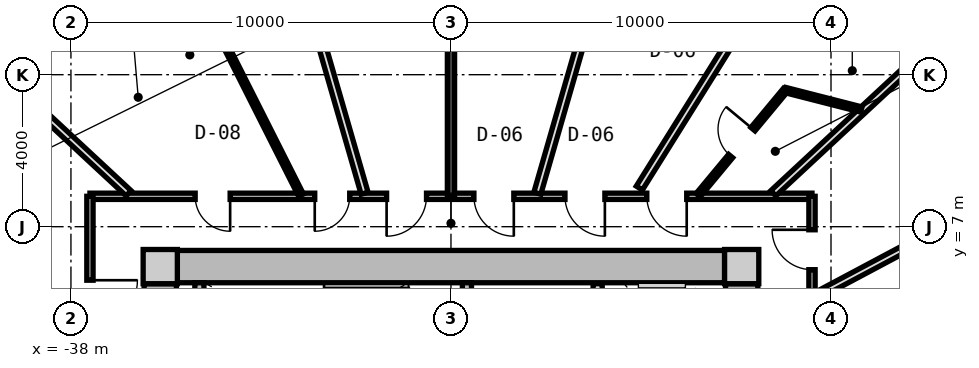
"""IFC4 building model, lengths in metres.
Left out: names, types, materials, properties, quantities, classifications, styles, units other than length and angle.
Written with IfcOpenShell. Run it as: python <this file> out.ifc"""

import sys

from ifc_helpers import new_model, si_unit, direction, frame, frame_2d, origin, origin_2d, place, context, subcontext, project, spatial, rectangle, extrude, source, transform, mapped, element, fill, save


model = new_model("IFC4")
c1 = context("Model", 3, precision=1e-05, world=origin(), true_north=direction((0.0, 1.0)))
c2 = subcontext(c1, "Body", "Model", "MODEL_VIEW")
j1 = project(units=[si_unit("LENGTHUNIT", "METRE"), si_unit("PLANEANGLEUNIT", "RADIAN")], contexts=[c1])
p1 = place(None, origin())
s1 = spatial("IfcSite", under=j1, at=p1, CompositionType="ELEMENT")
p2 = place(p1, origin())
s2 = spatial("IfcBuilding", under=s1, at=p2, CompositionType="ELEMENT")
p3 = place(p2, frame((0.0, 0.0, 24.65)))
s3 = spatial("IfcBuildingStorey", under=s2, at=p3, CompositionType="ELEMENT", Elevation=24.65)
m1 = source(origin(), c2, "Body", "SweptSolid", [
    extrude(rectangle(XDim=0.9, YDim=0.9, at=origin_2d()), origin(), (0.0, 0.0, 1.0), 3.05),
])
for number, where, z_axis, x_axis in (
    (1, (-20.35, 5.95, 0.0), (0.0, 0.0, 1.0), (1.0, 0.0, 0.0)),
    (2, (-35.65, 5.95, 0.0), (0.0, 0.0, 1.0), (1.0, 0.0, 0.0)),
):
    element("IfcColumn", number, at=place(p3, frame(where, z_axis=z_axis, x_axis=x_axis)), inside=s3, PredefinedType="COLUMN", context=c2, shape_type="MappedRepresentation", body=[
        mapped(m1, transform((0.0, 0.0, 0.0), x_axis=(1.0, 0.0, 0.0), y_axis=(0.0, 1.0, 0.0), z_axis=(0.0, 0.0, 1.0), scale=1.0)),
    ])
m2 = source(origin(), c2, "Body", "SweptSolid", [
    extrude(rectangle(XDim=14.4, YDim=0.85, at=frame_2d((7.2, 0.0))), origin(), (0.0, 0.0, 1.0), 2.79),
])
p4 = place(p3, frame((-35.2, 5.95, 0.0), z_axis=(0.0, 0.0, 1.0), x_axis=(1.0, 0.0, 0.0)))
e3 = element("IfcWall", 3, at=p4, inside=s3, PredefinedType="SHEAR", context=c2, shape_type="MappedRepresentation", body=[
    mapped(m2, transform((0.0, 0.0, 0.0), x_axis=(1.0, 0.0, 0.0), y_axis=(0.0, 1.0, 0.0), z_axis=(0.0, 0.0, 1.0), scale=1.0)),
])
m3 = source(origin(), c2, "Body", "SweptSolid", [
    extrude(rectangle(XDim=11.0, YDim=0.85, at=frame_2d((5.5, 0.0))), origin(), (0.0, 0.0, 1.0), 2.79),
])
p5 = place(p3, frame((-35.65, -5.5, 0.0), z_axis=(0.0, 0.0, 1.0), x_axis=(0.0, 1.0, 0.0)))
e4 = element("IfcWall", 4, at=p5, inside=s3, PredefinedType="SHEAR", context=c2, shape_type="MappedRepresentation", body=[
    mapped(m3, transform((0.0, 0.0, 0.0), x_axis=(1.0, 0.0, 0.0), y_axis=(0.0, 1.0, 0.0), z_axis=(0.0, 0.0, 1.0), scale=1.0)),
])
p6 = place(p5, frame((3.8, 0.0, 0.0)))
e5 = element("IfcOpeningElement", 5, at=p6, cuts=e4, PredefinedType="OPENING", context=c2, shape_type="SweptSolid", body=[
    extrude(rectangle(XDim=1.2, YDim=2.15, at=frame_2d((0.6, 1.075))), frame((0.0, 0.435, 0.0), z_axis=(0.0, -1.0, 0.0), x_axis=(1.0, 0.0, 0.0)), (0.0, 0.0, 1.0), 0.87),
])
p7 = place(p3, frame((-20.35, 5.5, 0.0), z_axis=(0.0, 0.0, 1.0), x_axis=(0.0, -1.0, 0.0)))
e6 = element("IfcWall", 6, at=p7, inside=s3, PredefinedType="SHEAR", context=c2, shape_type="MappedRepresentation", body=[
    mapped(m3, transform((0.0, 0.0, 0.0), x_axis=(1.0, 0.0, 0.0), y_axis=(0.0, 1.0, 0.0), z_axis=(0.0, 0.0, 1.0), scale=1.0)),
])
p8 = place(p7, frame((5.65, 0.0, 0.0)))
e7 = element("IfcOpeningElement", 7, at=p8, cuts=e6, PredefinedType="OPENING", context=c2, shape_type="SweptSolid", body=[
    extrude(rectangle(XDim=1.2, YDim=2.15, at=frame_2d((0.6, 1.075))), frame((0.0, 0.435, 0.0), z_axis=(0.0, -1.0, 0.0), x_axis=(1.0, 0.0, 0.0)), (0.0, 0.0, 1.0), 0.87),
])
m4 = source(origin(), c2, "Body", "SweptSolid", [
    extrude(rectangle(XDim=3.075, YDim=0.24, at=frame_2d((1.538, 0.0))), origin(), (0.0, 0.0, 1.0), 2.79),
])
p9 = place(p3, frame((-34.62, 2.45, 0.0), z_axis=(0.0, 0.0, 1.0), x_axis=(0.0, 1.0, 0.0)))
e8 = element("IfcWall", 8, at=p9, inside=s3, PredefinedType="PARTITIONING", context=c2, shape_type="MappedRepresentation", body=[
    mapped(m4, transform((0.0, 0.0, 0.0), x_axis=(1.0, 0.0, 0.0), y_axis=(0.0, 1.0, 0.0), z_axis=(0.0, 0.0, 1.0), scale=1.0)),
])
p10 = place(p3, frame((-27.58, 2.45, 0.0), z_axis=(0.0, 0.0, 1.0), x_axis=(0.0, 1.0, 0.0)))
e9 = element("IfcWall", 9, at=p10, inside=s3, PredefinedType="PARTITIONING", context=c2, shape_type="MappedRepresentation", body=[
    mapped(m4, transform((0.0, 0.0, 0.0), x_axis=(1.0, 0.0, 0.0), y_axis=(0.0, 1.0, 0.0), z_axis=(0.0, 0.0, 1.0), scale=1.0)),
])
p11 = place(p10, frame((0.55, 0.0, 0.0)))
e10 = element("IfcOpeningElement", 10, at=p11, cuts=e9, PredefinedType="OPENING", context=c2, shape_type="SweptSolid", body=[
    extrude(rectangle(XDim=1.1, YDim=2.15, at=frame_2d((0.55, 1.075))), frame((0.0, 0.13, 0.0), z_axis=(0.0, -1.0, 0.0), x_axis=(1.0, 0.0, 0.0)), (0.0, 0.0, 1.0), 0.26),
])
m5 = source(origin(), c2, "Body", "SweptSolid", [
    extrude(rectangle(XDim=5.0, YDim=0.24, at=frame_2d((2.5, 0.0))), origin(), (0.0, 0.0, 1.0), 2.775),
])
p12 = place(p3, frame((-24.14, 0.5, 0.0), z_axis=(0.0, 0.0, 1.0), x_axis=(0.0, 1.0, 0.0)))
e11 = element("IfcWall", 11, at=p12, inside=s3, PredefinedType="PARTITIONING", context=c2, shape_type="MappedRepresentation", body=[
    mapped(m5, transform((0.0, 0.0, 0.0), x_axis=(1.0, 0.0, 0.0), y_axis=(0.0, 1.0, 0.0), z_axis=(0.0, 0.0, 1.0), scale=1.0)),
])
p13 = place(p12, frame((3.05, 0.0, 0.0)))
e12 = element("IfcOpeningElement", 12, at=p13, cuts=e11, PredefinedType="OPENING", context=c2, shape_type="SweptSolid", body=[
    extrude(rectangle(XDim=1.3, YDim=2.2, at=frame_2d((0.65, 1.1))), frame((0.0, 0.13, 0.0), z_axis=(0.0, -1.0, 0.0), x_axis=(1.0, 0.0, 0.0)), (0.0, 0.0, 1.0), 0.26),
])
p14 = place(p12, frame((0.55, 0.0, 0.0)))
e13 = element("IfcOpeningElement", 13, at=p14, cuts=e11, PredefinedType="OPENING", context=c2, shape_type="SweptSolid", body=[
    extrude(rectangle(XDim=1.3, YDim=2.2, at=frame_2d((0.65, 1.1))), frame((0.0, 0.13, 0.0), z_axis=(0.0, -1.0, 0.0), x_axis=(1.0, 0.0, 0.0)), (0.0, 0.0, 1.0), 0.26),
])
m6 = source(origin(), c2, "Body", "SweptSolid", [
    extrude(rectangle(XDim=19.0, YDim=0.165, at=frame_2d((9.5, 0.0))), origin(), (0.0, 0.0, 1.0), 2.775),
])
p15 = place(p3, frame((-37.5, 7.8, 0.0), z_axis=(0.0, 0.0, 1.0), x_axis=(1.0, 0.0, 0.0)))
e14 = element("IfcWall", 14, at=p15, inside=s3, PredefinedType="PARTITIONING", context=c2, shape_type="MappedRepresentation", body=[
    mapped(m6, transform((0.0, 0.0, 0.0), x_axis=(1.0, 0.0, 0.0), y_axis=(0.0, 1.0, 0.0), z_axis=(0.0, 0.0, 1.0), scale=1.0)),
])
p16 = place(p15, frame((14.653, 0.0, 0.0)))
e15 = element("IfcOpeningElement", 15, at=p16, cuts=e14, PredefinedType="OPENING", context=c2, shape_type="SweptSolid", body=[
    extrude(rectangle(XDim=1.05, YDim=2.15, at=frame_2d((0.525, 1.075))), frame((0.0, 0.093, 0.0), z_axis=(0.0, -1.0, 0.0), x_axis=(1.0, 0.0, 0.0)), (0.0, 0.0, 1.0), 0.185),
])
p17 = place(p15, frame((12.5, 0.0, 0.0)))
e16 = element("IfcOpeningElement", 16, at=p17, cuts=e14, PredefinedType="OPENING", context=c2, shape_type="SweptSolid", body=[
    extrude(rectangle(XDim=1.05, YDim=2.15, at=frame_2d((0.525, 1.075))), frame((0.0, 0.093, 0.0), z_axis=(0.0, -1.0, 0.0), x_axis=(1.0, 0.0, 0.0)), (0.0, 0.0, 1.0), 0.185),
])
p18 = place(p15, frame((10.104, 0.0, 0.0)))
e17 = element("IfcOpeningElement", 17, at=p18, cuts=e14, PredefinedType="OPENING", context=c2, shape_type="SweptSolid", body=[
    extrude(rectangle(XDim=1.05, YDim=2.15, at=frame_2d((0.525, 1.075))), frame((0.0, 0.093, 0.0), z_axis=(0.0, -1.0, 0.0), x_axis=(1.0, 0.0, 0.0)), (0.0, 0.0, 1.0), 0.185),
])
p19 = place(p15, frame((7.806, 0.0, 0.0)))
e18 = element("IfcOpeningElement", 18, at=p19, cuts=e14, PredefinedType="OPENING", context=c2, shape_type="SweptSolid", body=[
    extrude(rectangle(XDim=1.05, YDim=2.15, at=frame_2d((0.525, 1.075))), frame((0.0, 0.093, 0.0), z_axis=(0.0, -1.0, 0.0), x_axis=(1.0, 0.0, 0.0)), (0.0, 0.0, 1.0), 0.185),
])
p20 = place(p15, frame((5.915, 0.0, 0.0)))
e19 = element("IfcOpeningElement", 19, at=p20, cuts=e14, PredefinedType="OPENING", context=c2, shape_type="SweptSolid", body=[
    extrude(rectangle(XDim=0.92, YDim=2.1, at=frame_2d((0.46, 1.05))), frame((0.0, 0.093, 0.0), z_axis=(0.0, -1.0, 0.0), x_axis=(1.0, 0.0, 0.0)), (0.0, 0.0, 1.0), 0.185),
])
p21 = place(p15, frame((2.769, 0.0, 0.0)))
e20 = element("IfcOpeningElement", 20, at=p21, cuts=e14, PredefinedType="OPENING", context=c2, shape_type="SweptSolid", body=[
    extrude(rectangle(XDim=0.92, YDim=2.1, at=frame_2d((0.46, 1.05))), frame((0.0, 0.093, 0.0), z_axis=(0.0, -1.0, 0.0), x_axis=(1.0, 0.0, 0.0)), (0.0, 0.0, 1.0), 0.185),
])
m7 = source(origin(), c2, "Body", "SweptSolid", [
    extrude(rectangle(XDim=15.6, YDim=0.165, at=frame_2d((7.8, 0.0))), origin(), (0.0, 0.0, 1.0), 2.775),
])
p22 = place(p3, frame((-37.5, -7.8, 0.0), z_axis=(0.0, 0.0, 1.0), x_axis=(0.0, 1.0, 0.0)))
e21 = element("IfcWall", 21, at=p22, inside=s3, PredefinedType="PARTITIONING", context=c2, shape_type="MappedRepresentation", body=[
    mapped(m7, transform((0.0, 0.0, 0.0), x_axis=(1.0, 0.0, 0.0), y_axis=(0.0, 1.0, 0.0), z_axis=(0.0, 0.0, 1.0), scale=1.0)),
])
p23 = place(p22, frame((12.141, 0.0, 0.0)))
e22 = element("IfcOpeningElement", 22, at=p23, cuts=e21, PredefinedType="OPENING", context=c2, shape_type="SweptSolid", body=[
    extrude(rectangle(XDim=1.25, YDim=2.2, at=frame_2d((0.625, 1.1))), frame((0.0, 0.093, 0.0), z_axis=(0.0, -1.0, 0.0), x_axis=(1.0, 0.0, 0.0)), (0.0, 0.0, 1.0), 0.185),
])
p24 = place(p22, frame((7.175, 0.0, 0.0)))
e23 = element("IfcOpeningElement", 23, at=p24, cuts=e21, PredefinedType="OPENING", context=c2, shape_type="SweptSolid", body=[
    extrude(rectangle(XDim=1.25, YDim=2.2, at=frame_2d((0.625, 1.1))), frame((0.0, 0.093, 0.0), z_axis=(0.0, -1.0, 0.0), x_axis=(1.0, 0.0, 0.0)), (0.0, 0.0, 1.0), 0.185),
])
p25 = place(p22, frame((2.208, 0.0, 0.0)))
e24 = element("IfcOpeningElement", 24, at=p25, cuts=e21, PredefinedType="OPENING", context=c2, shape_type="SweptSolid", body=[
    extrude(rectangle(XDim=1.25, YDim=2.2, at=frame_2d((0.625, 1.1))), frame((0.0, 0.093, 0.0), z_axis=(0.0, -1.0, 0.0), x_axis=(1.0, 0.0, 0.0)), (0.0, 0.0, 1.0), 0.185),
])
p26 = place(p3, frame((-18.5, 7.8, 0.0), z_axis=(0.0, 0.0, 1.0), x_axis=(0.0, -1.0, 0.0)))
e25 = element("IfcWall", 25, at=p26, inside=s3, PredefinedType="PARTITIONING", context=c2, shape_type="MappedRepresentation", body=[
    mapped(m7, transform((0.0, 0.0, 0.0), x_axis=(1.0, 0.0, 0.0), y_axis=(0.0, 1.0, 0.0), z_axis=(0.0, 0.0, 1.0), scale=1.0)),
])
p27 = place(p26, frame((12.141, 0.0, 0.0)))
e26 = element("IfcOpeningElement", 26, at=p27, cuts=e25, PredefinedType="OPENING", context=c2, shape_type="SweptSolid", body=[
    extrude(rectangle(XDim=1.25, YDim=2.2, at=frame_2d((0.625, 1.1))), frame((0.0, 0.093, 0.0), z_axis=(0.0, -1.0, 0.0), x_axis=(1.0, 0.0, 0.0)), (0.0, 0.0, 1.0), 0.185),
])
p28 = place(p26, frame((7.175, 0.0, 0.0)))
e27 = element("IfcOpeningElement", 27, at=p28, cuts=e25, PredefinedType="OPENING", context=c2, shape_type="SweptSolid", body=[
    extrude(rectangle(XDim=1.25, YDim=2.2, at=frame_2d((0.625, 1.1))), frame((0.0, 0.093, 0.0), z_axis=(0.0, -1.0, 0.0), x_axis=(1.0, 0.0, 0.0)), (0.0, 0.0, 1.0), 0.185),
])
p29 = place(p26, frame((2.826, 0.0, 0.0)))
e28 = element("IfcOpeningElement", 28, at=p29, cuts=e25, PredefinedType="OPENING", context=c2, shape_type="SweptSolid", body=[
    extrude(rectangle(XDim=1.05, YDim=2.15, at=frame_2d((0.525, 1.075))), frame((0.0, 0.093, 0.0), z_axis=(0.0, -1.0, 0.0), x_axis=(1.0, 0.0, 0.0)), (0.0, 0.0, 1.0), 0.185),
])
p30 = place(p26, frame((0.881, 0.0, 0.0)))
e29 = element("IfcOpeningElement", 29, at=p30, cuts=e25, PredefinedType="OPENING", context=c2, shape_type="SweptSolid", body=[
    extrude(rectangle(XDim=1.05, YDim=2.15, at=frame_2d((0.525, 1.075))), frame((0.0, 0.093, 0.0), z_axis=(0.0, -1.0, 0.0), x_axis=(1.0, 0.0, 0.0)), (0.0, 0.0, 1.0), 0.185),
])
m8 = source(origin(), c2, "Body", "SweptSolid", [
    extrude(rectangle(XDim=7.435, YDim=0.19, at=frame_2d((3.717, 0.0))), origin(), (0.0, 0.0, 1.0), 2.225),
])
p31 = place(p3, frame((-19.517, 7.88, 0.0), z_axis=(0.0, 0.0, 1.0), x_axis=(0.732651956848, 0.680603489652, 0.0)))
e30 = element("IfcWall", 30, at=p31, inside=s3, PredefinedType="PARTITIONING", context=c2, shape_type="MappedRepresentation", body=[
    mapped(m8, transform((0.0, 0.0, 0.0), x_axis=(1.0, 0.0, 0.0), y_axis=(0.0, 1.0, 0.0), z_axis=(0.0, 0.0, 1.0), scale=1.0)),
])
m9 = source(origin(), c2, "Body", "SweptSolid", [
    extrude(rectangle(XDim=10.196, YDim=0.19, at=frame_2d((5.098, 0.0))), origin(), (0.0, 0.0, 1.0), 2.225),
])
p32 = place(p3, frame((-25.727, 7.88, 0.0), z_axis=(0.0, 0.0, 1.0), x_axis=(0.277136420347, 0.960830580549, 0.0)))
e31 = element("IfcWall", 31, at=p32, inside=s3, PredefinedType="PARTITIONING", context=c2, shape_type="MappedRepresentation", body=[
    mapped(m9, transform((0.0, 0.0, 0.0), x_axis=(1.0, 0.0, 0.0), y_axis=(0.0, 1.0, 0.0), z_axis=(0.0, 0.0, 1.0), scale=1.0)),
])
m10 = source(origin(), c2, "Body", "SweptSolid", [
    extrude(rectangle(XDim=8.598, YDim=0.19, at=frame_2d((4.299, 0.0))), origin(), (0.0, 0.0, 1.0), 2.775),
])
p33 = place(p3, frame((-23.043, 8.017, 0.0), z_axis=(0.0, 0.0, 1.0), x_axis=(0.530039776395, 0.847972779893, 0.0)))
e32 = element("IfcWall", 32, at=p33, inside=s3, PredefinedType="PARTITIONING", context=c2, shape_type="MappedRepresentation", body=[
    mapped(m10, transform((0.0, 0.0, 0.0), x_axis=(1.0, 0.0, 0.0), y_axis=(0.0, 1.0, 0.0), z_axis=(0.0, 0.0, 1.0), scale=1.0)),
])
m11 = source(origin(), c2, "Body", "SweptSolid", [
    extrude(rectangle(XDim=3.594, YDim=0.14, at=frame_2d((1.797, 0.0))), origin(), (0.0, 0.0, 1.0), 2.775),
])
p34 = place(p3, frame((-21.496, 7.83, 0.0), z_axis=(0.0, 0.0, 1.0), x_axis=(0.639001147083, 0.769205781326, 0.0)))
e33 = element("IfcWall", 33, at=p34, inside=s3, PredefinedType="PARTITIONING", context=c2, shape_type="MappedRepresentation", body=[
    mapped(m11, transform((0.0, 0.0, 0.0), x_axis=(1.0, 0.0, 0.0), y_axis=(0.0, 1.0, 0.0), z_axis=(0.0, 0.0, 1.0), scale=1.0)),
])
p35 = place(p34, frame((1.337, 0.0, 0.0)))
e34 = element("IfcOpeningElement", 34, at=p35, cuts=e33, PredefinedType="OPENING", context=c2, shape_type="SweptSolid", body=[
    extrude(rectangle(XDim=0.92, YDim=2.1, at=frame_2d((0.46, 1.05))), frame((0.0, 0.08, 0.0), z_axis=(0.0, -1.0, 0.0), x_axis=(1.0, 0.0, 0.0)), (0.0, 0.0, 1.0), 0.16),
])
m12 = source(origin(), c2, "Body", "SweptSolid", [
    extrude(rectangle(XDim=2.062, YDim=0.14, at=frame_2d((1.031, 0.0))), origin(), (0.0, 0.0, 1.0), 2.415),
])
p36 = place(p3, frame((-19.199, 10.595, 0.0), z_axis=(0.0, 0.0, 1.0), x_axis=(0.968776253543, -0.247936626121, 0.0)))
e35 = element("IfcWall", 35, at=p36, inside=s3, PredefinedType="PARTITIONING", context=c2, shape_type="MappedRepresentation", body=[
    mapped(m12, transform((0.0, 0.0, 0.0), x_axis=(1.0, 0.0, 0.0), y_axis=(0.0, 1.0, 0.0), z_axis=(0.0, 0.0, 1.0), scale=1.0)),
])
p37 = place(p3, frame((-30.273, 7.88, 0.0), z_axis=(0.0, 0.0, 1.0), x_axis=(-0.277136420347, 0.960830580549, 0.0)))
e36 = element("IfcWall", 36, at=p37, inside=s3, PredefinedType="PARTITIONING", context=c2, shape_type="MappedRepresentation", body=[
    mapped(m9, transform((0.0, 0.0, 0.0), x_axis=(1.0, 0.0, 0.0), y_axis=(0.0, 1.0, 0.0), z_axis=(0.0, 0.0, 1.0), scale=1.0)),
])
m13 = source(origin(), c2, "Body", "SweptSolid", [
    extrude(rectangle(XDim=9.846, YDim=0.19, at=frame_2d((4.923, 0.0))), origin(), (0.0, 0.0, 1.0), 2.775),
])
p38 = place(p3, frame((-28.0, 7.83, 0.0), z_axis=(0.0, 0.0, 1.0), x_axis=(0.0, 1.0, 0.0)))
e37 = element("IfcWall", 37, at=p38, inside=s3, PredefinedType="PARTITIONING", context=c2, shape_type="MappedRepresentation", body=[
    mapped(m13, transform((0.0, 0.0, 0.0), x_axis=(1.0, 0.0, 0.0), y_axis=(0.0, 1.0, 0.0), z_axis=(0.0, 0.0, 1.0), scale=1.0)),
])
p39 = place(p3, frame((-36.483, 7.88, 0.0), z_axis=(0.0, 0.0, 1.0), x_axis=(-0.732651956848, 0.680603489652, 0.0)))
e38 = element("IfcWall", 38, at=p39, inside=s3, PredefinedType="PARTITIONING", context=c2, shape_type="MappedRepresentation", body=[
    mapped(m8, transform((0.0, 0.0, 0.0), x_axis=(1.0, 0.0, 0.0), y_axis=(0.0, 1.0, 0.0), z_axis=(0.0, 0.0, 1.0), scale=1.0)),
])
m14 = source(origin(), c2, "Body", "SweptSolid", [
    extrude(rectangle(XDim=9.225, YDim=0.14, at=frame_2d((4.613, 0.0))), origin(), (0.0, 0.0, 1.0), 2.775),
])
p40 = place(p3, frame((-31.946, 7.83, 0.0), z_axis=(0.0, 0.0, 1.0), x_axis=(-0.450460543767, 0.892796336523, 0.0)))
e39 = element("IfcWall", 39, at=p40, inside=s3, PredefinedType="PARTITIONING", context=c2, shape_type="MappedRepresentation", body=[
    mapped(m14, transform((0.0, 0.0, 0.0), x_axis=(1.0, 0.0, 0.0), y_axis=(0.0, 1.0, 0.0), z_axis=(0.0, 0.0, 1.0), scale=1.0)),
])
m15 = source(origin(), c2, "Body", "SweptSolid", [
    extrude(rectangle(XDim=7.677, YDim=0.19, at=frame_2d((3.838, 0.0))), origin(), (0.0, 0.0, 1.0), 2.775),
])
p41 = place(p3, frame((-18.297, 5.231, 0.0), z_axis=(0.0, 0.0, 1.0), x_axis=(0.882725057546, 0.469889851753, 0.0)))
e40 = element("IfcWall", 40, at=p41, inside=s3, PredefinedType="PARTITIONING", context=c2, shape_type="MappedRepresentation", body=[
    mapped(m15, transform((0.0, 0.0, 0.0), x_axis=(1.0, 0.0, 0.0), y_axis=(0.0, 1.0, 0.0), z_axis=(0.0, 0.0, 1.0), scale=1.0)),
])
m16 = source(origin(), c2, "Body", "SweptSolid", [
    extrude(rectangle(XDim=1.05, YDim=2.15, at=frame_2d((0.525, 1.075))), frame((0.0, 0.025, 0.0), z_axis=(0.0, -1.0, 0.0), x_axis=(1.0, 0.0, 0.0)), (0.0, 0.0, 1.0), 0.05),
])
p42 = place(p16, frame((1.05, 0.0, 0.0), z_axis=(0.0, 0.0, 1.0), x_axis=(-1.0, 0.0, 0.0)))
e41 = element("IfcDoor", 41, at=p42, inside=s3, OperationType="SINGLE_SWING_LEFT", PredefinedType="DOOR", context=c2, shape_type="MappedRepresentation", body=[
    mapped(m16, transform((0.0, 0.0, 0.0), x_axis=(1.0, 0.0, 0.0), y_axis=(0.0, 1.0, 0.0), z_axis=(0.0, 0.0, 1.0), scale=1.0)),
])
fill(e15, e41)
m17 = source(origin(), c2, "Body", "SweptSolid", [
    extrude(rectangle(XDim=0.92, YDim=2.1, at=frame_2d((0.46, 1.05))), frame((0.0, 0.025, 0.0), z_axis=(0.0, -1.0, 0.0), x_axis=(1.0, 0.0, 0.0)), (0.0, 0.0, 1.0), 0.05),
])
p43 = place(p35, origin())
e42 = element("IfcDoor", 42, at=p43, inside=s3, OperationType="SINGLE_SWING_RIGHT", PredefinedType="DOOR", context=c2, shape_type="MappedRepresentation", body=[
    mapped(m17, transform((0.0, 0.0, 0.0), x_axis=(1.0, 0.0, 0.0), y_axis=(0.0, 1.0, 0.0), z_axis=(0.0, 0.0, 1.0), scale=1.0)),
])
fill(e34, e42)
p44 = place(p17, frame((1.05, 0.0, 0.0), z_axis=(0.0, 0.0, 1.0), x_axis=(-1.0, 0.0, 0.0)))
e43 = element("IfcDoor", 43, at=p44, inside=s3, OperationType="SINGLE_SWING_LEFT", PredefinedType="DOOR", context=c2, shape_type="MappedRepresentation", body=[
    mapped(m16, transform((0.0, 0.0, 0.0), x_axis=(1.0, 0.0, 0.0), y_axis=(0.0, 1.0, 0.0), z_axis=(0.0, 0.0, 1.0), scale=1.0)),
])
fill(e16, e43)
p45 = place(p18, frame((1.05, 0.0, 0.0), z_axis=(0.0, 0.0, 1.0), x_axis=(-1.0, 0.0, 0.0)))
e44 = element("IfcDoor", 44, at=p45, inside=s3, OperationType="SINGLE_SWING_LEFT", PredefinedType="DOOR", context=c2, shape_type="MappedRepresentation", body=[
    mapped(m16, transform((0.0, 0.0, 0.0), x_axis=(1.0, 0.0, 0.0), y_axis=(0.0, 1.0, 0.0), z_axis=(0.0, 0.0, 1.0), scale=1.0)),
])
fill(e17, e44)
p46 = place(p19, frame((1.05, 0.0, 0.0), z_axis=(0.0, 0.0, 1.0), x_axis=(-1.0, 0.0, 0.0)))
e45 = element("IfcDoor", 45, at=p46, inside=s3, OperationType="SINGLE_SWING_RIGHT", PredefinedType="DOOR", context=c2, shape_type="MappedRepresentation", body=[
    mapped(m16, transform((0.0, 0.0, 0.0), x_axis=(1.0, 0.0, 0.0), y_axis=(0.0, 1.0, 0.0), z_axis=(0.0, 0.0, 1.0), scale=1.0)),
])
fill(e18, e45)
p47 = place(p20, frame((0.92, 0.0, 0.0), z_axis=(0.0, 0.0, 1.0), x_axis=(-1.0, 0.0, 0.0)))
e46 = element("IfcDoor", 46, at=p47, inside=s3, OperationType="SINGLE_SWING_RIGHT", PredefinedType="DOOR", context=c2, shape_type="MappedRepresentation", body=[
    mapped(m17, transform((0.0, 0.0, 0.0), x_axis=(1.0, 0.0, 0.0), y_axis=(0.0, 1.0, 0.0), z_axis=(0.0, 0.0, 1.0), scale=1.0)),
])
fill(e19, e46)
p48 = place(p21, frame((0.92, 0.0, 0.0), z_axis=(0.0, 0.0, 1.0), x_axis=(-1.0, 0.0, 0.0)))
e47 = element("IfcDoor", 47, at=p48, inside=s3, OperationType="SINGLE_SWING_LEFT", PredefinedType="DOOR", context=c2, shape_type="MappedRepresentation", body=[
    mapped(m17, transform((0.0, 0.0, 0.0), x_axis=(1.0, 0.0, 0.0), y_axis=(0.0, 1.0, 0.0), z_axis=(0.0, 0.0, 1.0), scale=1.0)),
])
fill(e20, e47)
m18 = source(origin(), c2, "Body", "SweptSolid", [
    extrude(rectangle(XDim=1.25, YDim=2.2, at=frame_2d((0.625, 1.1))), frame((0.0, 0.025, 0.0), z_axis=(0.0, -1.0, 0.0), x_axis=(1.0, 0.0, 0.0)), (0.0, 0.0, 1.0), 0.05),
])
p49 = place(p23, frame((1.25, 0.0, 0.0), z_axis=(0.0, 0.0, 1.0), x_axis=(-1.0, 0.0, 0.0)))
e48 = element("IfcDoor", 48, at=p49, inside=s3, OperationType="SINGLE_SWING_LEFT", PredefinedType="DOOR", context=c2, shape_type="MappedRepresentation", body=[
    mapped(m18, transform((0.0, 0.0, 0.0), x_axis=(1.0, 0.0, 0.0), y_axis=(0.0, 1.0, 0.0), z_axis=(0.0, 0.0, 1.0), scale=1.0)),
])
fill(e22, e48)
p50 = place(p30, frame((1.05, 0.0, 0.0), z_axis=(0.0, 0.0, 1.0), x_axis=(-1.0, 0.0, 0.0)))
e49 = element("IfcDoor", 49, at=p50, inside=s3, OperationType="SINGLE_SWING_RIGHT", PredefinedType="DOOR", context=c2, shape_type="MappedRepresentation", body=[
    mapped(m16, transform((0.0, 0.0, 0.0), x_axis=(1.0, 0.0, 0.0), y_axis=(0.0, 1.0, 0.0), z_axis=(0.0, 0.0, 1.0), scale=1.0)),
])
fill(e29, e49)
save(model, sys.argv[1])
